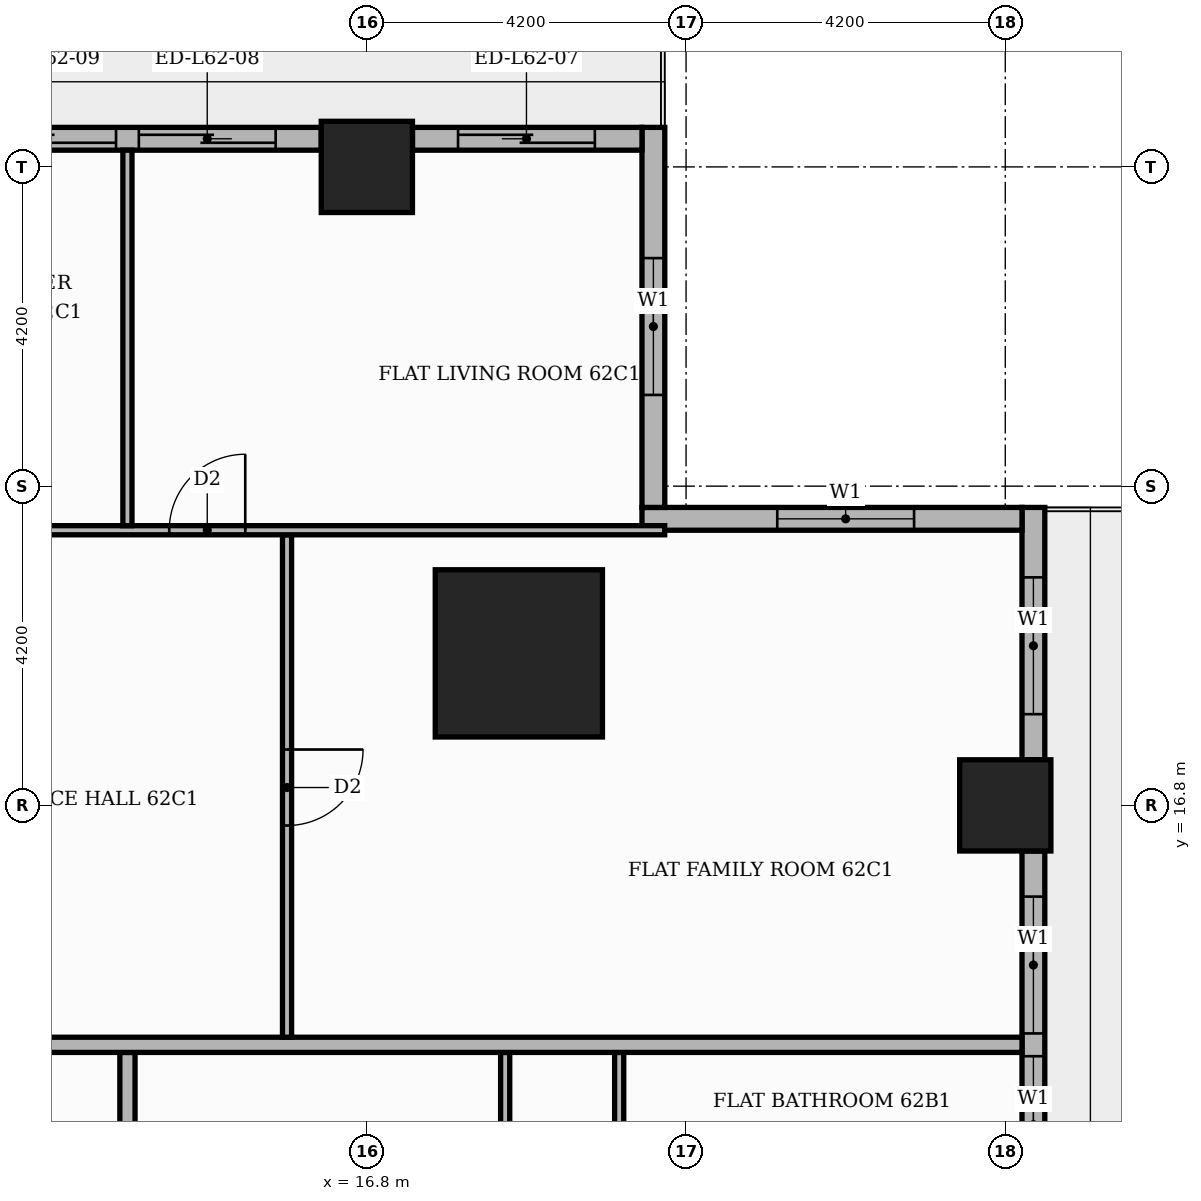
"""IFC4 building model, lengths in metres.
Left out: names, types, materials, properties, quantities, classifications, styles, units other than length and angle.
Written with IfcOpenShell. Run it as: python <this file> out.ifc"""

import sys

from ifc_helpers import new_model, si_unit, direction, frame, frame_2d, origin, origin_2d, place, context, subcontext, project, spatial, rectangle, extrude, element, fill, save


model = new_model("IFC4")
c1 = context("Model", 3, precision=1e-05, world=origin(), true_north=direction((0.0, 1.0)))
c2 = subcontext(c1, "Body", "Model", "MODEL_VIEW")
j1 = project(units=[si_unit("LENGTHUNIT", "METRE"), si_unit("PLANEANGLEUNIT", "RADIAN")], contexts=[c1])
p1 = place(None, origin())
s1 = spatial("IfcSite", under=j1, at=p1, CompositionType="ELEMENT")
p2 = place(p1, origin())
s2 = spatial("IfcBuilding", under=s1, at=p2, CompositionType="ELEMENT")
p3 = place(p2, frame((0.0, 0.0, 260.1)))
s3 = spatial("IfcBuildingStorey", under=s2, at=p3, CompositionType="ELEMENT", Elevation=260.1)
p4 = place(p3, frame((18.8, 18.8, 0.0), z_axis=(0.0, 0.0, 1.0), x_axis=(1.0, 0.0, 0.0)))
e1 = element("IfcColumn", 1, at=p4, inside=s3, PredefinedType="COLUMN", context=c2, shape_type="SweptSolid", body=[
    extrude(rectangle(XDim=2.2, YDim=2.2, at=origin_2d()), origin(), (0.0, 0.0, 1.0), 3.9),
])
for number, where, z_axis, x_axis in (
    (2, (25.2, 16.8, 0.0), (0.0, 0.0, 1.0), (1.0, 0.0, 0.0)),
    (3, (16.8, 25.2, 0.0), (0.0, 0.0, 1.0), (1.0, 0.0, 0.0)),
):
    element("IfcColumn", number, at=place(p3, frame(where, z_axis=z_axis, x_axis=x_axis)), inside=s3, PredefinedType="COLUMN", context=c2, shape_type="SweptSolid", body=[
        extrude(rectangle(XDim=1.2, YDim=1.2, at=origin_2d()), origin(), (0.0, 0.0, 1.0), 3.9),
    ])
p5 = place(p3, frame((25.57, 9.0, 0.0), z_axis=(0.0, 0.0, 1.0), x_axis=(0.0, 1.0, 0.0)))
e4 = element("IfcWall", 4, at=p5, inside=s3, PredefinedType="STANDARD", context=c2, shape_type="SweptSolid", body=[
    extrude(rectangle(XDim=7.2, YDim=0.3, at=frame_2d((3.6, 0.0))), origin(), (0.0, 0.0, 1.0), 3.48),
])
p6 = place(p5, frame((0.6, 0.0, 0.9)))
e5 = element("IfcOpeningElement", 5, at=p6, cuts=e4, PredefinedType="OPENING", context=c2, shape_type="SweptSolid", body=[
    extrude(rectangle(XDim=1.8, YDim=2.1, at=frame_2d((0.9, 1.05))), frame((0.0, 0.16, 0.0), z_axis=(0.0, -1.0, 0.0), x_axis=(1.0, 0.0, 0.0)), (0.0, 0.0, 1.0), 0.32),
])
p7 = place(p5, frame((2.7, 0.0, 0.9)))
e6 = element("IfcOpeningElement", 6, at=p7, cuts=e4, PredefinedType="OPENING", context=c2, shape_type="SweptSolid", body=[
    extrude(rectangle(XDim=1.8, YDim=2.1, at=frame_2d((0.9, 1.05))), frame((0.0, 0.16, 0.0), z_axis=(0.0, -1.0, 0.0), x_axis=(1.0, 0.0, 0.0)), (0.0, 0.0, 1.0), 0.32),
])
p8 = place(p5, frame((4.8, 0.0, 0.9)))
e7 = element("IfcOpeningElement", 7, at=p8, cuts=e4, PredefinedType="OPENING", context=c2, shape_type="SweptSolid", body=[
    extrude(rectangle(XDim=1.8, YDim=2.1, at=frame_2d((0.9, 1.05))), frame((0.0, 0.16, 0.0), z_axis=(0.0, -1.0, 0.0), x_axis=(1.0, 0.0, 0.0)), (0.0, 0.0, 1.0), 0.32),
])
p9 = place(p3, frame((25.57, 17.4, 0.0), z_axis=(0.0, 0.0, 1.0), x_axis=(0.0, 1.0, 0.0)))
e8 = element("IfcWall", 8, at=p9, inside=s3, PredefinedType="STANDARD", context=c2, shape_type="SweptSolid", body=[
    extrude(rectangle(XDim=3.32, YDim=0.3, at=frame_2d((1.66, 0.0))), origin(), (0.0, 0.0, 1.0), 3.48),
])
p10 = place(p9, frame((0.6, 0.0, 0.9)))
e9 = element("IfcOpeningElement", 9, at=p10, cuts=e8, PredefinedType="OPENING", context=c2, shape_type="SweptSolid", body=[
    extrude(rectangle(XDim=1.8, YDim=2.1, at=frame_2d((0.9, 1.05))), frame((0.0, 0.16, 0.0), z_axis=(0.0, -1.0, 0.0), x_axis=(1.0, 0.0, 0.0)), (0.0, 0.0, 1.0), 0.32),
])
p11 = place(p3, frame((25.42, 20.57, 0.0), z_axis=(0.0, 0.0, 1.0), x_axis=(-1.0, 0.0, 0.0)))
e10 = element("IfcWall", 10, at=p11, inside=s3, PredefinedType="STANDARD", context=c2, shape_type="SweptSolid", body=[
    extrude(rectangle(XDim=5.0, YDim=0.3, at=frame_2d((2.5, 0.0))), origin(), (0.0, 0.0, 1.0), 3.48),
])
p12 = place(p11, frame((1.42, 0.0, 0.9)))
e11 = element("IfcOpeningElement", 11, at=p12, cuts=e10, PredefinedType="OPENING", context=c2, shape_type="SweptSolid", body=[
    extrude(rectangle(XDim=1.8, YDim=2.1, at=frame_2d((0.9, 1.05))), frame((0.0, 0.16, 0.0), z_axis=(0.0, -1.0, 0.0), x_axis=(1.0, 0.0, 0.0)), (0.0, 0.0, 1.0), 0.32),
])
p13 = place(p3, frame((20.57, 20.72, 0.0), z_axis=(0.0, 0.0, 1.0), x_axis=(0.0, 1.0, 0.0)))
e12 = element("IfcWall", 12, at=p13, inside=s3, PredefinedType="STANDARD", context=c2, shape_type="SweptSolid", body=[
    extrude(rectangle(XDim=5.0, YDim=0.3, at=frame_2d((2.5, 0.0))), origin(), (0.0, 0.0, 1.0), 3.48),
])
p14 = place(p13, frame((1.48, 0.0, 0.9)))
e13 = element("IfcOpeningElement", 13, at=p14, cuts=e12, PredefinedType="OPENING", context=c2, shape_type="SweptSolid", body=[
    extrude(rectangle(XDim=1.8, YDim=2.1, at=frame_2d((0.9, 1.05))), frame((0.0, 0.16, 0.0), z_axis=(0.0, -1.0, 0.0), x_axis=(1.0, 0.0, 0.0)), (0.0, 0.0, 1.0), 0.32),
])
p15 = place(p3, frame((20.42, 25.57, 0.0), z_axis=(0.0, 0.0, 1.0), x_axis=(-1.0, 0.0, 0.0)))
e14 = element("IfcWall", 14, at=p15, inside=s3, PredefinedType="STANDARD", context=c2, shape_type="SweptSolid", body=[
    extrude(rectangle(XDim=3.02, YDim=0.3, at=frame_2d((1.51, 0.0))), origin(), (0.0, 0.0, 1.0), 3.48),
])
p16 = place(p15, frame((0.62, 0.0, 0.0)))
e15 = element("IfcOpeningElement", 15, at=p16, cuts=e14, PredefinedType="OPENING", context=c2, shape_type="SweptSolid", body=[
    extrude(rectangle(XDim=1.8, YDim=2.4, at=frame_2d((0.9, 1.2))), frame((0.0, 0.16, 0.0), z_axis=(0.0, -1.0, 0.0), x_axis=(1.0, 0.0, 0.0)), (0.0, 0.0, 1.0), 0.32),
])
p17 = place(p3, frame((16.2, 25.57, 0.0), z_axis=(0.0, 0.0, 1.0), x_axis=(-1.0, 0.0, 0.0)))
e16 = element("IfcWall", 16, at=p17, inside=s3, PredefinedType="STANDARD", context=c2, shape_type="SweptSolid", body=[
    extrude(rectangle(XDim=7.2, YDim=0.3, at=frame_2d((3.6, 0.0))), origin(), (0.0, 0.0, 1.0), 3.48),
])
p18 = place(p17, frame((0.6, 0.0, 0.0)))
e17 = element("IfcOpeningElement", 17, at=p18, cuts=e16, PredefinedType="OPENING", context=c2, shape_type="SweptSolid", body=[
    extrude(rectangle(XDim=1.8, YDim=2.4, at=frame_2d((0.9, 1.2))), frame((0.0, 0.16, 0.0), z_axis=(0.0, -1.0, 0.0), x_axis=(1.0, 0.0, 0.0)), (0.0, 0.0, 1.0), 0.32),
])
p19 = place(p17, frame((2.7, 0.0, 0.0)))
e18 = element("IfcOpeningElement", 18, at=p19, cuts=e16, PredefinedType="OPENING", context=c2, shape_type="SweptSolid", body=[
    extrude(rectangle(XDim=1.8, YDim=2.4, at=frame_2d((0.9, 1.2))), frame((0.0, 0.16, 0.0), z_axis=(0.0, -1.0, 0.0), x_axis=(1.0, 0.0, 0.0)), (0.0, 0.0, 1.0), 0.32),
])
p20 = place(p17, frame((4.8, 0.0, 0.9)))
e19 = element("IfcOpeningElement", 19, at=p20, cuts=e16, PredefinedType="OPENING", context=c2, shape_type="SweptSolid", body=[
    extrude(rectangle(XDim=1.8, YDim=2.1, at=frame_2d((0.9, 1.05))), frame((0.0, 0.16, 0.0), z_axis=(0.0, -1.0, 0.0), x_axis=(1.0, 0.0, 0.0)), (0.0, 0.0, 1.0), 0.32),
])
p21 = place(p3, frame((18.62, 9.66, 0.0), z_axis=(0.0, 0.0, 1.0), x_axis=(0.0, 1.0, 0.0)))
e20 = element("IfcWall", 20, at=p21, inside=s3, PredefinedType="PARTITIONING", context=c2, shape_type="SweptSolid", body=[
    extrude(rectangle(XDim=3.89, YDim=0.12, at=frame_2d((1.945, 0.0))), origin(), (0.0, 0.0, 1.0), 3.48),
])
p22 = place(p21, frame((1.515, 0.0, 0.0)))
e21 = element("IfcOpeningElement", 21, at=p22, cuts=e20, PredefinedType="OPENING", context=c2, shape_type="SweptSolid", body=[
    extrude(rectangle(XDim=0.9, YDim=2.1, at=frame_2d((0.45, 1.05))), frame((0.0, 0.07, 0.0), z_axis=(0.0, -1.0, 0.0), x_axis=(1.0, 0.0, 0.0)), (0.0, 0.0, 1.0), 0.14),
])
p23 = place(p3, frame((13.65, 11.1, 0.0), z_axis=(0.0, 0.0, 1.0), x_axis=(0.0, 1.0, 0.0)))
e22 = element("IfcWall", 22, at=p23, inside=s3, PredefinedType="PARTITIONING", context=c2, shape_type="SweptSolid", body=[
    extrude(rectangle(XDim=2.45, YDim=0.2, at=frame_2d((1.225, 0.0))), origin(), (0.0, 0.0, 1.0), 3.48),
])
p24 = place(p3, frame((20.12, 11.61, 0.0), z_axis=(0.0, 0.0, 1.0), x_axis=(0.0, 1.0, 0.0)))
e23 = element("IfcWall", 23, at=p24, inside=s3, PredefinedType="PARTITIONING", context=c2, shape_type="SweptSolid", body=[
    extrude(rectangle(XDim=1.94, YDim=0.12, at=frame_2d((0.97, 0.0))), origin(), (0.0, 0.0, 1.0), 3.48),
])
p25 = place(p3, frame((-13.65, 13.65, 0.0), z_axis=(0.0, 0.0, 1.0), x_axis=(1.0, 0.0, 0.0)))
e24 = element("IfcWall", 24, at=p25, inside=s3, PredefinedType="PARTITIONING", context=c2, shape_type="SweptSolid", body=[
    extrude(rectangle(XDim=39.07, YDim=0.2, at=frame_2d((19.535, 0.0))), origin(), (0.0, 0.0, 1.0), 3.48),
])
p26 = place(p25, frame((24.65, 0.0, 0.0)))
e25 = element("IfcOpeningElement", 25, at=p26, cuts=e24, PredefinedType="OPENING", context=c2, shape_type="SweptSolid", body=[
    extrude(rectangle(XDim=1.1, YDim=2.4, at=frame_2d((0.55, 1.2))), frame((0.0, 0.11, 0.0), z_axis=(0.0, -1.0, 0.0), x_axis=(1.0, 0.0, 0.0)), (0.0, 0.0, 1.0), 0.22),
])
p27 = place(p25, frame((14.15, 0.0, 0.0)))
e26 = element("IfcOpeningElement", 26, at=p27, cuts=e24, PredefinedType="OPENING", context=c2, shape_type="SweptSolid", body=[
    extrude(rectangle(XDim=1.1, YDim=2.4, at=frame_2d((0.55, 1.2))), frame((0.0, 0.11, 0.0), z_axis=(0.0, -1.0, 0.0), x_axis=(1.0, 0.0, 0.0)), (0.0, 0.0, 1.0), 0.22),
])
p28 = place(p3, frame((15.75, 13.75, 0.0), z_axis=(0.0, 0.0, 1.0), x_axis=(0.0, 1.0, 0.0)))
e27 = element("IfcWall", 27, at=p28, inside=s3, PredefinedType="PARTITIONING", context=c2, shape_type="SweptSolid", body=[
    extrude(rectangle(XDim=6.61, YDim=0.12, at=frame_2d((3.305, 0.0))), origin(), (0.0, 0.0, 1.0), 3.48),
])
p29 = place(p28, frame((2.785, 0.0, 0.0)))
e28 = element("IfcOpeningElement", 28, at=p29, cuts=e27, PredefinedType="OPENING", context=c2, shape_type="SweptSolid", body=[
    extrude(rectangle(XDim=1.0, YDim=2.1, at=frame_2d((0.5, 1.05))), frame((0.0, 0.07, 0.0), z_axis=(0.0, -1.0, 0.0), x_axis=(1.0, 0.0, 0.0)), (0.0, 0.0, 1.0), 0.14),
])
p30 = place(p3, frame((5.35, 20.42, 0.0), z_axis=(0.0, 0.0, 1.0), x_axis=(1.0, 0.0, 0.0)))
e29 = element("IfcWall", 29, at=p30, inside=s3, PredefinedType="PARTITIONING", context=c2, shape_type="SweptSolid", body=[
    extrude(rectangle(XDim=15.369, YDim=0.12, at=frame_2d((7.685, 0.0))), origin(), (0.0, 0.0, 1.0), 3.48),
])
p31 = place(p30, frame((8.85, 0.0, 0.0)))
e30 = element("IfcOpeningElement", 30, at=p31, cuts=e29, PredefinedType="OPENING", context=c2, shape_type="SweptSolid", body=[
    extrude(rectangle(XDim=1.0, YDim=2.1, at=frame_2d((0.5, 1.05))), frame((0.0, 0.07, 0.0), z_axis=(0.0, -1.0, 0.0), x_axis=(1.0, 0.0, 0.0)), (0.0, 0.0, 1.0), 0.14),
])
p32 = place(p30, frame((5.75, 0.0, 0.0)))
e31 = element("IfcOpeningElement", 31, at=p32, cuts=e29, PredefinedType="OPENING", context=c2, shape_type="SweptSolid", body=[
    extrude(rectangle(XDim=0.9, YDim=2.1, at=frame_2d((0.45, 1.05))), frame((0.0, 0.07, 0.0), z_axis=(0.0, -1.0, 0.0), x_axis=(1.0, 0.0, 0.0)), (0.0, 0.0, 1.0), 0.14),
])
p33 = place(p3, frame((13.65, 20.48, 0.0), z_axis=(0.0, 0.0, 1.0), x_axis=(0.0, 1.0, 0.0)))
e32 = element("IfcWall", 32, at=p33, inside=s3, PredefinedType="PARTITIONING", context=c2, shape_type="SweptSolid", body=[
    extrude(rectangle(XDim=4.94, YDim=0.12, at=frame_2d((2.47, 0.0))), origin(), (0.0, 0.0, 1.0), 3.48),
])
p34 = place(p7, origin())
e33 = element("IfcWindow", 33, at=p34, inside=s3, PartitioningType="SINGLE_PANEL", PredefinedType="WINDOW", context=c2, shape_type="SweptSolid", body=[
    extrude(rectangle(XDim=1.8, YDim=2.1, at=frame_2d((0.9, 1.05))), frame((0.0, 0.03, 0.0), z_axis=(0.0, -1.0, 0.0), x_axis=(1.0, 0.0, 0.0)), (0.0, 0.0, 1.0), 0.06),
])
fill(e6, e33)
p35 = place(p8, origin())
e34 = element("IfcWindow", 34, at=p35, inside=s3, PartitioningType="SINGLE_PANEL", PredefinedType="WINDOW", context=c2, shape_type="SweptSolid", body=[
    extrude(rectangle(XDim=1.8, YDim=2.1, at=frame_2d((0.9, 1.05))), frame((0.0, 0.03, 0.0), z_axis=(0.0, -1.0, 0.0), x_axis=(1.0, 0.0, 0.0)), (0.0, 0.0, 1.0), 0.06),
])
fill(e7, e34)
p36 = place(p10, origin())
e35 = element("IfcWindow", 35, at=p36, inside=s3, PartitioningType="SINGLE_PANEL", PredefinedType="WINDOW", context=c2, shape_type="SweptSolid", body=[
    extrude(rectangle(XDim=1.8, YDim=2.1, at=frame_2d((0.9, 1.05))), frame((0.0, 0.03, 0.0), z_axis=(0.0, -1.0, 0.0), x_axis=(1.0, 0.0, 0.0)), (0.0, 0.0, 1.0), 0.06),
])
fill(e9, e35)
p37 = place(p12, origin())
e36 = element("IfcWindow", 36, at=p37, inside=s3, PartitioningType="SINGLE_PANEL", PredefinedType="WINDOW", context=c2, shape_type="SweptSolid", body=[
    extrude(rectangle(XDim=1.8, YDim=2.1, at=frame_2d((0.9, 1.05))), frame((0.0, 0.03, 0.0), z_axis=(0.0, -1.0, 0.0), x_axis=(1.0, 0.0, 0.0)), (0.0, 0.0, 1.0), 0.06),
])
fill(e11, e36)
p38 = place(p14, origin())
e37 = element("IfcWindow", 37, at=p38, inside=s3, PartitioningType="SINGLE_PANEL", PredefinedType="WINDOW", context=c2, shape_type="SweptSolid", body=[
    extrude(rectangle(XDim=1.8, YDim=2.1, at=frame_2d((0.9, 1.05))), frame((0.0, 0.03, 0.0), z_axis=(0.0, -1.0, 0.0), x_axis=(1.0, 0.0, 0.0)), (0.0, 0.0, 1.0), 0.06),
])
fill(e13, e37)
p39 = place(p16, origin())
e38 = element("IfcDoor", 38, at=p39, inside=s3, OperationType="SLIDING_TO_RIGHT", PredefinedType="DOOR", context=c2, shape_type="SweptSolid", body=[
    extrude(rectangle(XDim=1.8, YDim=2.4, at=frame_2d((0.9, 1.2))), frame((0.0, 0.025, 0.0), z_axis=(0.0, -1.0, 0.0), x_axis=(1.0, 0.0, 0.0)), (0.0, 0.0, 1.0), 0.05),
])
fill(e15, e38)
p40 = place(p18, origin())
e39 = element("IfcDoor", 39, at=p40, inside=s3, OperationType="SLIDING_TO_LEFT", PredefinedType="DOOR", context=c2, shape_type="SweptSolid", body=[
    extrude(rectangle(XDim=1.8, YDim=2.4, at=frame_2d((0.9, 1.2))), frame((0.0, 0.025, 0.0), z_axis=(0.0, -1.0, 0.0), x_axis=(1.0, 0.0, 0.0)), (0.0, 0.0, 1.0), 0.05),
])
fill(e17, e39)
p41 = place(p19, origin())
e40 = element("IfcDoor", 40, at=p41, inside=s3, OperationType="SLIDING_TO_RIGHT", PredefinedType="DOOR", context=c2, shape_type="SweptSolid", body=[
    extrude(rectangle(XDim=1.8, YDim=2.4, at=frame_2d((0.9, 1.2))), frame((0.0, 0.025, 0.0), z_axis=(0.0, -1.0, 0.0), x_axis=(1.0, 0.0, 0.0)), (0.0, 0.0, 1.0), 0.05),
])
fill(e18, e40)
p42 = place(p29, frame((1.0, 0.0, 0.0), z_axis=(0.0, 0.0, 1.0), x_axis=(-1.0, 0.0, 0.0)))
e41 = element("IfcDoor", 41, at=p42, inside=s3, OperationType="SINGLE_SWING_RIGHT", PredefinedType="DOOR", context=c2, shape_type="SweptSolid", body=[
    extrude(rectangle(XDim=1.0, YDim=2.1, at=frame_2d((0.5, 1.05))), frame((0.0, 0.025, 0.0), z_axis=(0.0, -1.0, 0.0), x_axis=(1.0, 0.0, 0.0)), (0.0, 0.0, 1.0), 0.05),
])
fill(e28, e41)
p43 = place(p31, origin())
e42 = element("IfcDoor", 42, at=p43, inside=s3, OperationType="SINGLE_SWING_RIGHT", PredefinedType="DOOR", context=c2, shape_type="SweptSolid", body=[
    extrude(rectangle(XDim=1.0, YDim=2.1, at=frame_2d((0.5, 1.05))), frame((0.0, 0.025, 0.0), z_axis=(0.0, -1.0, 0.0), x_axis=(1.0, 0.0, 0.0)), (0.0, 0.0, 1.0), 0.05),
])
fill(e30, e42)
save(model, sys.argv[1])
